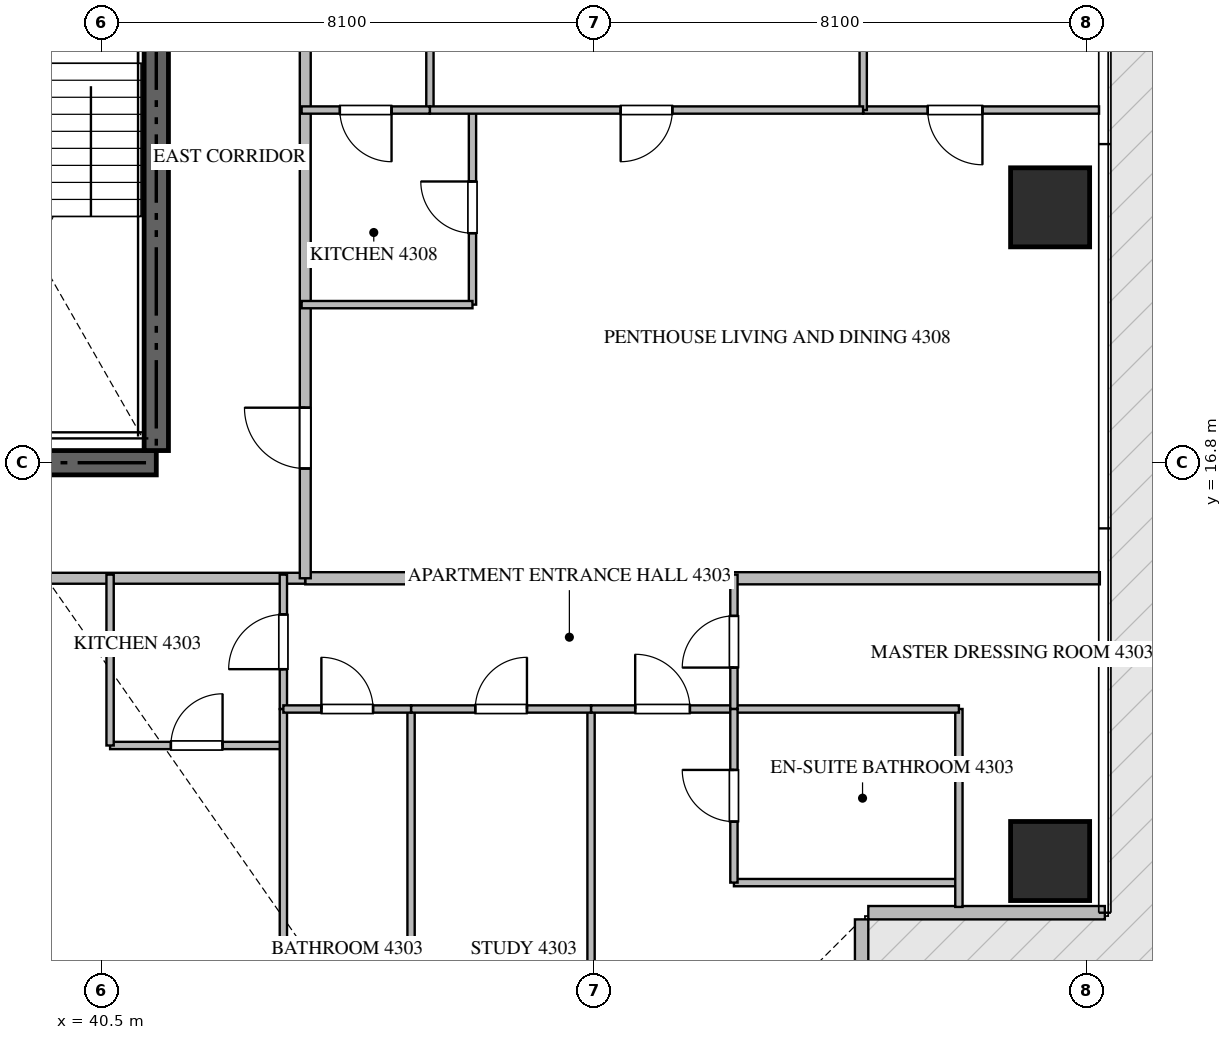
"""IFC4 building model, lengths in metres.
Left out: names, types, materials, properties, quantities, classifications, styles, units other than length and angle.
Written with IfcOpenShell. Run it as: python <this file> out.ifc"""

import sys

from ifc_helpers import new_model, si_unit, direction, frame, frame_2d, origin, origin_2d, place, context, subcontext, project, spatial, rectangle, extrude, source, transform, mapped, element, fill, save


model = new_model("IFC4")
c1 = context("Model", 3, precision=1e-05, world=origin(), true_north=direction((0.0, 1.0)))
c2 = subcontext(c1, "Body", "Model", "MODEL_VIEW")
j1 = project(units=[si_unit("LENGTHUNIT", "METRE"), si_unit("PLANEANGLEUNIT", "RADIAN")], contexts=[c1])
p1 = place(None, origin())
s1 = spatial("IfcSite", under=j1, at=p1, CompositionType="ELEMENT")
p2 = place(p1, origin())
s2 = spatial("IfcBuilding", under=s1, at=p2, CompositionType="ELEMENT")
p3 = place(p2, frame((0.0, 0.0, 172.65)))
s3 = spatial("IfcBuildingStorey", under=s2, at=p3, CompositionType="ELEMENT", Elevation=172.65)
p4 = place(p3, frame((23.4, 16.8, -0.26), z_axis=(0.0, 0.0, 1.0), x_axis=(1.0, 0.0, 0.0)))
e1 = element("IfcWall", 1, at=p4, inside=s3, PredefinedType="SHEAR", context=c2, shape_type="SweptSolid", body=[
    extrude(rectangle(XDim=18.0, YDim=0.4, at=frame_2d((9.0, 0.0))), origin(), (0.0, 0.0, 1.0), 3.748),
])
p5 = place(p3, frame((41.4, 17.0, -0.26), z_axis=(0.0, 0.0, 1.0), x_axis=(0.0, 1.0, 0.0)))
e2 = element("IfcWall", 2, at=p5, inside=s3, PredefinedType="SHEAR", context=c2, shape_type="SweptSolid", body=[
    extrude(rectangle(XDim=8.35, YDim=0.4, at=frame_2d((4.175, 0.0))), origin(), (0.0, 0.0, 1.0), 3.748),
])
m1 = source(origin(), c2, "Body", "SweptSolid", [
    extrude(rectangle(XDim=1.3, YDim=1.3, at=origin_2d()), origin(), (0.0, 0.0, 1.0), 3.75),
])
for number, where, z_axis, x_axis in (
    (3, (56.1, 10.25, -0.26), (0.0, 0.0, 1.0), (1.0, 0.0, 0.0)),
    (4, (56.1, 21.0, -0.26), (0.0, 0.0, 1.0), (1.0, 0.0, 0.0)),
):
    element("IfcColumn", number, at=place(p3, frame(where, z_axis=z_axis, x_axis=x_axis)), inside=s3, PredefinedType="COLUMN", context=c2, shape_type="MappedRepresentation", body=[
        mapped(m1, transform((0.0, 0.0, 0.0), scale=1.0)),
    ])
p6 = place(p3, frame((53.0, 5.51, 0.0), z_axis=(0.0, 0.0, 1.0), x_axis=(0.0, 1.0, 0.0)))
e5 = element("IfcWall", 5, at=p6, inside=s3, PredefinedType="ELEMENTEDWALL", context=c2, shape_type="SweptSolid", body=[
    extrude(rectangle(XDim=3.78, YDim=0.22, at=frame_2d((1.89, 0.0))), origin(), (0.0, 0.0, 1.0), 3.475),
])
p7 = place(p6, frame((1.19, 0.0, 0.65)))
e6 = element("IfcOpeningElement", 6, at=p7, cuts=e5, PredefinedType="OPENING", context=c2, shape_type="SweptSolid", body=[
    extrude(rectangle(XDim=1.4, YDim=2.05, at=frame_2d((0.7, 1.025))), frame((0.0, 0.12, 0.0), z_axis=(0.0, -1.0, 0.0), x_axis=(1.0, 0.0, 0.0)), (0.0, 0.0, 1.0), 0.24),
])
p8 = place(p3, frame((53.11, 9.4, 0.0), z_axis=(0.0, 0.0, 1.0), x_axis=(1.0, 0.0, 0.0)))
e7 = element("IfcWall", 7, at=p8, inside=s3, PredefinedType="ELEMENTEDWALL", context=c2, shape_type="SweptSolid", body=[
    extrude(rectangle(XDim=3.89, YDim=0.22, at=frame_2d((1.945, 0.0))), origin(), (0.0, 0.0, 1.0), 3.475),
])
p9 = place(p3, frame((43.85, 14.9, 0.0), z_axis=(0.0, 0.0, 1.0), x_axis=(1.0, 0.0, 0.0)))
e8 = element("IfcWall", 8, at=p9, inside=s3, PredefinedType="PARTITIONING", context=c2, shape_type="SweptSolid", body=[
    extrude(rectangle(XDim=13.068, YDim=0.2, at=frame_2d((6.534, 0.0))), origin(), (0.0, 0.0, 1.0), 3.49),
])
p10 = place(p3, frame((20.952, 14.9, 0.0), z_axis=(0.0, 0.0, 1.0), x_axis=(1.0, 0.0, 0.0)))
e9 = element("IfcWall", 9, at=p10, inside=s3, PredefinedType="PARTITIONING", context=c2, shape_type="SweptSolid", body=[
    extrude(rectangle(XDim=22.896, YDim=0.18, at=frame_2d((11.448, 0.0))), origin(), (0.0, 0.0, 1.0), 3.49),
])
p11 = place(p10, frame((2.387, 0.0, 0.0)))
e10 = element("IfcOpeningElement", 10, at=p11, cuts=e9, PredefinedType="OPENING", context=c2, shape_type="SweptSolid", body=[
    extrude(rectangle(XDim=1.0, YDim=2.15, at=frame_2d((0.5, 1.075))), frame((0.0, 0.1, 0.0), z_axis=(0.0, -1.0, 0.0), x_axis=(1.0, 0.0, 0.0)), (0.0, 0.0, 1.0), 0.2),
])
p12 = place(p10, frame((6.591, 0.0, 0.0)))
e11 = element("IfcOpeningElement", 11, at=p12, cuts=e9, PredefinedType="OPENING", context=c2, shape_type="SweptSolid", body=[
    extrude(rectangle(XDim=1.0, YDim=2.15, at=frame_2d((0.5, 1.075))), frame((0.0, 0.1, 0.0), z_axis=(0.0, -1.0, 0.0), x_axis=(1.0, 0.0, 0.0)), (0.0, 0.0, 1.0), 0.2),
])
p13 = place(p10, frame((16.51, 0.0, 0.0)))
e12 = element("IfcOpeningElement", 12, at=p13, cuts=e9, PredefinedType="OPENING", context=c2, shape_type="SweptSolid", body=[
    extrude(rectangle(XDim=1.0, YDim=2.15, at=frame_2d((0.5, 1.075))), frame((0.0, 0.1, 0.0), z_axis=(0.0, -1.0, 0.0), x_axis=(1.0, 0.0, 0.0)), (0.0, 0.0, 1.0), 0.2),
])
p14 = place(p3, frame((43.85, 14.9, 0.0), z_axis=(0.0, 0.0, 1.0), x_axis=(0.0, 1.0, 0.0)))
e13 = element("IfcWall", 13, at=p14, inside=s3, PredefinedType="PARTITIONING", context=c2, shape_type="SweptSolid", body=[
    extrude(rectangle(XDim=18.7, YDim=0.18, at=frame_2d((9.35, 0.0))), origin(), (0.0, 0.0, 1.0), 3.49),
])
p15 = place(p14, frame((1.805, 0.0, 0.0)))
e14 = element("IfcOpeningElement", 14, at=p15, cuts=e13, PredefinedType="OPENING", context=c2, shape_type="SweptSolid", body=[
    extrude(rectangle(XDim=1.0, YDim=2.15, at=frame_2d((0.5, 1.075))), frame((0.0, 0.1, 0.0), z_axis=(0.0, -1.0, 0.0), x_axis=(1.0, 0.0, 0.0)), (0.0, 0.0, 1.0), 0.2),
])
p16 = place(p3, frame((40.64, 12.15, 0.0), z_axis=(0.0, 0.0, 1.0), x_axis=(1.0, 0.0, 0.0)))
e15 = element("IfcWall", 15, at=p16, inside=s3, PredefinedType="PARTITIONING", context=c2, shape_type="SweptSolid", body=[
    extrude(rectangle(XDim=2.85, YDim=0.12, at=frame_2d((1.425, 0.0))), origin(), (0.0, 0.0, 1.0), 3.49),
])
p17 = place(p16, frame((1.0, 0.0, 0.0)))
e16 = element("IfcOpeningElement", 16, at=p17, cuts=e15, PredefinedType="OPENING", context=c2, shape_type="SweptSolid", body=[
    extrude(rectangle(XDim=0.85, YDim=2.1, at=frame_2d((0.425, 1.05))), frame((0.0, 0.07, 0.0), z_axis=(0.0, -1.0, 0.0), x_axis=(1.0, 0.0, 0.0)), (0.0, 0.0, 1.0), 0.14),
])
p18 = place(p3, frame((40.64, 12.15, 0.0), z_axis=(0.0, 0.0, 1.0), x_axis=(0.0, 1.0, 0.0)))
e17 = element("IfcWall", 17, at=p18, inside=s3, PredefinedType="PARTITIONING", context=c2, shape_type="SweptSolid", body=[
    extrude(rectangle(XDim=2.81, YDim=0.12, at=frame_2d((1.405, 0.0))), origin(), (0.0, 0.0, 1.0), 3.49),
])
p19 = place(p3, frame((43.49, 12.75, 0.0), z_axis=(0.0, 0.0, 1.0), x_axis=(0.0, 1.0, 0.0)))
e18 = element("IfcWall", 18, at=p19, inside=s3, PredefinedType="PARTITIONING", context=c2, shape_type="SweptSolid", body=[
    extrude(rectangle(XDim=2.21, YDim=0.12, at=frame_2d((1.105, 0.0))), origin(), (0.0, 0.0, 1.0), 3.49),
])
p20 = place(p19, frame((0.655, 0.0, 0.0)))
e19 = element("IfcOpeningElement", 19, at=p20, cuts=e18, PredefinedType="OPENING", context=c2, shape_type="SweptSolid", body=[
    extrude(rectangle(XDim=0.9, YDim=2.1, at=frame_2d((0.45, 1.05))), frame((0.0, 0.07, 0.0), z_axis=(0.0, -1.0, 0.0), x_axis=(1.0, 0.0, 0.0)), (0.0, 0.0, 1.0), 0.14),
])
p21 = place(p3, frame((43.49, 5.388, 0.0), z_axis=(0.0, 0.0, 1.0), x_axis=(0.0, 1.0, 0.0)))
e20 = element("IfcWall", 20, at=p21, inside=s3, PredefinedType="PARTITIONING", context=c2, shape_type="SweptSolid", body=[
    extrude(rectangle(XDim=7.36, YDim=0.12, at=frame_2d((3.68, 0.0))), origin(), (0.0, 0.0, 1.0), 3.49),
])
p22 = place(p3, frame((48.55, 1.495, 0.0), z_axis=(0.0, 0.0, 1.0), x_axis=(0.0, 1.0, 0.0)))
e21 = element("IfcWall", 21, at=p22, inside=s3, PredefinedType="PARTITIONING", context=c2, shape_type="SweptSolid", body=[
    extrude(rectangle(XDim=11.255, YDim=0.12, at=frame_2d((5.627, 0.0))), origin(), (0.0, 0.0, 1.0), 3.49),
])
p23 = place(p3, frame((45.59, 5.386, 0.0), z_axis=(0.0, 0.0, 1.0), x_axis=(0.0, 1.0, 0.0)))
e22 = element("IfcWall", 22, at=p23, inside=s3, PredefinedType="PARTITIONING", context=c2, shape_type="SweptSolid", body=[
    extrude(rectangle(XDim=7.364, YDim=0.12, at=frame_2d((3.682, 0.0))), origin(), (0.0, 0.0, 1.0), 3.49),
])
p24 = place(p3, frame((43.49, 12.75, 0.0), z_axis=(0.0, 0.0, 1.0), x_axis=(1.0, 0.0, 0.0)))
e23 = element("IfcWall", 23, at=p24, inside=s3, PredefinedType="PARTITIONING", context=c2, shape_type="SweptSolid", body=[
    extrude(rectangle(XDim=2.1, YDim=0.12, at=frame_2d((1.05, 0.0))), origin(), (0.0, 0.0, 1.0), 3.49),
])
p25 = place(p24, frame((0.625, 0.0, 0.0)))
e24 = element("IfcOpeningElement", 24, at=p25, cuts=e23, PredefinedType="OPENING", context=c2, shape_type="SweptSolid", body=[
    extrude(rectangle(XDim=0.85, YDim=2.1, at=frame_2d((0.425, 1.05))), frame((0.0, 0.07, 0.0), z_axis=(0.0, -1.0, 0.0), x_axis=(1.0, 0.0, 0.0)), (0.0, 0.0, 1.0), 0.14),
])
p26 = place(p3, frame((45.592, 12.75, 0.0), z_axis=(0.0, 0.0, 1.0), x_axis=(1.0, 0.0, 0.0)))
e25 = element("IfcWall", 25, at=p26, inside=s3, PredefinedType="PARTITIONING", context=c2, shape_type="SweptSolid", body=[
    extrude(rectangle(XDim=2.958, YDim=0.12, at=frame_2d((1.479, 0.0))), origin(), (0.0, 0.0, 1.0), 3.49),
])
p27 = place(p26, frame((1.054, 0.0, 0.0)))
e26 = element("IfcOpeningElement", 26, at=p27, cuts=e25, PredefinedType="OPENING", context=c2, shape_type="SweptSolid", body=[
    extrude(rectangle(XDim=0.85, YDim=2.1, at=frame_2d((0.425, 1.05))), frame((0.0, 0.07, 0.0), z_axis=(0.0, -1.0, 0.0), x_axis=(1.0, 0.0, 0.0)), (0.0, 0.0, 1.0), 0.14),
])
p28 = place(p3, frame((48.552, 12.75, 0.0), z_axis=(0.0, 0.0, 1.0), x_axis=(1.0, 0.0, 0.0)))
e27 = element("IfcWall", 27, at=p28, inside=s3, PredefinedType="PARTITIONING", context=c2, shape_type="SweptSolid", body=[
    extrude(rectangle(XDim=2.348, YDim=0.12, at=frame_2d((1.174, 0.0))), origin(), (0.0, 0.0, 1.0), 3.49),
])
p29 = place(p28, frame((0.724, 0.0, 0.0)))
e28 = element("IfcOpeningElement", 28, at=p29, cuts=e27, PredefinedType="OPENING", context=c2, shape_type="SweptSolid", body=[
    extrude(rectangle(XDim=0.9, YDim=2.1, at=frame_2d((0.45, 1.05))), frame((0.0, 0.07, 0.0), z_axis=(0.0, -1.0, 0.0), x_axis=(1.0, 0.0, 0.0)), (0.0, 0.0, 1.0), 0.14),
])
p30 = place(p3, frame((50.9, 9.895, 0.0), z_axis=(0.0, 0.0, 1.0), x_axis=(1.0, 0.0, 0.0)))
e29 = element("IfcWall", 29, at=p30, inside=s3, PredefinedType="PARTITIONING", context=c2, shape_type="SweptSolid", body=[
    extrude(rectangle(XDim=3.7, YDim=0.12, at=frame_2d((1.85, 0.0))), origin(), (0.0, 0.0, 1.0), 3.49),
])
p31 = place(p3, frame((54.6, 9.495, 0.0), z_axis=(0.0, 0.0, 1.0), x_axis=(0.0, 1.0, 0.0)))
e30 = element("IfcWall", 30, at=p31, inside=s3, PredefinedType="PARTITIONING", context=c2, shape_type="SweptSolid", body=[
    extrude(rectangle(XDim=3.255, YDim=0.12, at=frame_2d((1.627, 0.0))), origin(), (0.0, 0.0, 1.0), 3.49),
])
p32 = place(p3, frame((50.902, 12.75, 0.0), z_axis=(0.0, 0.0, 1.0), x_axis=(1.0, 0.0, 0.0)))
e31 = element("IfcWall", 31, at=p32, inside=s3, PredefinedType="PARTITIONING", context=c2, shape_type="SweptSolid", body=[
    extrude(rectangle(XDim=3.698, YDim=0.12, at=frame_2d((1.849, 0.0))), origin(), (0.0, 0.0, 1.0), 3.49),
])
p33 = place(p3, frame((50.9, 9.895, 0.0), z_axis=(0.0, 0.0, 1.0), x_axis=(0.0, 1.0, 0.0)))
e32 = element("IfcWall", 32, at=p33, inside=s3, PredefinedType="PARTITIONING", context=c2, shape_type="SweptSolid", body=[
    extrude(rectangle(XDim=2.855, YDim=0.12, at=frame_2d((1.427, 0.0))), origin(), (0.0, 0.0, 1.0), 3.49),
])
p34 = place(p33, frame((1.003, 0.0, 0.0)))
e33 = element("IfcOpeningElement", 33, at=p34, cuts=e32, PredefinedType="OPENING", context=c2, shape_type="SweptSolid", body=[
    extrude(rectangle(XDim=0.85, YDim=2.1, at=frame_2d((0.425, 1.05))), frame((0.0, 0.07, 0.0), z_axis=(0.0, -1.0, 0.0), x_axis=(1.0, 0.0, 0.0)), (0.0, 0.0, 1.0), 0.14),
])
p35 = place(p3, frame((50.9, 12.752, 0.0), z_axis=(0.0, 0.0, 1.0), x_axis=(0.0, 1.0, 0.0)))
e34 = element("IfcWall", 34, at=p35, inside=s3, PredefinedType="PARTITIONING", context=c2, shape_type="SweptSolid", body=[
    extrude(rectangle(XDim=2.208, YDim=0.12, at=frame_2d((1.104, 0.0))), origin(), (0.0, 0.0, 1.0), 3.49),
])
p36 = place(p35, frame((0.679, 0.0, 0.0)))
e35 = element("IfcOpeningElement", 35, at=p36, cuts=e34, PredefinedType="OPENING", context=c2, shape_type="SweptSolid", body=[
    extrude(rectangle(XDim=0.85, YDim=2.1, at=frame_2d((0.425, 1.05))), frame((0.0, 0.07, 0.0), z_axis=(0.0, -1.0, 0.0), x_axis=(1.0, 0.0, 0.0)), (0.0, 0.0, 1.0), 0.14),
])
p37 = place(p3, frame((46.6, 19.4, 0.0), z_axis=(0.0, 0.0, 1.0), x_axis=(0.0, 1.0, 0.0)))
e36 = element("IfcWall", 36, at=p37, inside=s3, PredefinedType="PARTITIONING", context=c2, shape_type="SweptSolid", body=[
    extrude(rectangle(XDim=3.2, YDim=0.12, at=frame_2d((1.6, 0.0))), origin(), (0.0, 0.0, 1.0), 3.49),
])
p38 = place(p37, frame((1.175, 0.0, 0.0)))
e37 = element("IfcOpeningElement", 37, at=p38, cuts=e36, PredefinedType="OPENING", context=c2, shape_type="SweptSolid", body=[
    extrude(rectangle(XDim=0.85, YDim=2.1, at=frame_2d((0.425, 1.05))), frame((0.0, 0.07, 0.0), z_axis=(0.0, -1.0, 0.0), x_axis=(1.0, 0.0, 0.0)), (0.0, 0.0, 1.0), 0.14),
])
p39 = place(p3, frame((46.6, 19.4, 0.0), z_axis=(0.0, 0.0, 1.0), x_axis=(-1.0, 0.0, 0.0)))
e38 = element("IfcWall", 38, at=p39, inside=s3, PredefinedType="PARTITIONING", context=c2, shape_type="SweptSolid", body=[
    extrude(rectangle(XDim=2.81, YDim=0.12, at=frame_2d((1.405, 0.0))), origin(), (0.0, 0.0, 1.0), 3.49),
])
p40 = place(p3, frame((56.905, 22.6, 0.0), z_axis=(0.0, 0.0, 1.0), x_axis=(-1.0, 0.0, 0.0)))
e39 = element("IfcWall", 39, at=p40, inside=s3, PredefinedType="PARTITIONING", context=c2, shape_type="SweptSolid", body=[
    extrude(rectangle(XDim=3.879, YDim=0.12, at=frame_2d((1.939, 0.0))), origin(), (0.0, 0.0, 1.0), 3.49),
])
p41 = place(p40, frame((1.918, 0.0, 0.0)))
e40 = element("IfcOpeningElement", 40, at=p41, cuts=e39, PredefinedType="OPENING", context=c2, shape_type="SweptSolid", body=[
    extrude(rectangle(XDim=0.9, YDim=2.1, at=frame_2d((0.45, 1.05))), frame((0.0, 0.07, 0.0), z_axis=(0.0, -1.0, 0.0), x_axis=(1.0, 0.0, 0.0)), (0.0, 0.0, 1.0), 0.14),
])
p42 = place(p3, frame((53.026, 22.6, 0.0), z_axis=(0.0, 0.0, 1.0), x_axis=(0.0, 1.0, 0.0)))
e41 = element("IfcWall", 41, at=p42, inside=s3, PredefinedType="PARTITIONING", context=c2, shape_type="SweptSolid", body=[
    extrude(rectangle(XDim=11.06, YDim=0.12, at=frame_2d((5.53, 0.0))), origin(), (0.0, 0.0, 1.0), 3.49),
])
p43 = place(p3, frame((45.9, 22.6, 0.0), z_axis=(0.0, 0.0, 1.0), x_axis=(0.0, 1.0, 0.0)))
e42 = element("IfcWall", 42, at=p43, inside=s3, PredefinedType="PARTITIONING", context=c2, shape_type="SweptSolid", body=[
    extrude(rectangle(XDim=3.2, YDim=0.12, at=frame_2d((1.6, 0.0))), origin(), (0.0, 0.0, 1.0), 3.49),
])
p44 = place(p3, frame((53.024, 22.6, 0.0), z_axis=(0.0, 0.0, 1.0), x_axis=(-1.0, 0.0, 0.0)))
e43 = element("IfcWall", 43, at=p44, inside=s3, PredefinedType="PARTITIONING", context=c2, shape_type="SweptSolid", body=[
    extrude(rectangle(XDim=7.124, YDim=0.12, at=frame_2d((3.562, 0.0))), origin(), (0.0, 0.0, 1.0), 3.49),
])
p45 = place(p44, frame((3.137, 0.0, 0.0)))
e44 = element("IfcOpeningElement", 44, at=p45, cuts=e43, PredefinedType="OPENING", context=c2, shape_type="SweptSolid", body=[
    extrude(rectangle(XDim=0.85, YDim=2.1, at=frame_2d((0.425, 1.05))), frame((0.0, 0.07, 0.0), z_axis=(0.0, -1.0, 0.0), x_axis=(1.0, 0.0, 0.0)), (0.0, 0.0, 1.0), 0.14),
])
p46 = place(p3, frame((45.898, 22.6, 0.0), z_axis=(0.0, 0.0, 1.0), x_axis=(-1.0, 0.0, 0.0)))
e45 = element("IfcWall", 45, at=p46, inside=s3, PredefinedType="PARTITIONING", context=c2, shape_type="SweptSolid", body=[
    extrude(rectangle(XDim=2.108, YDim=0.12, at=frame_2d((1.054, 0.0))), origin(), (0.0, 0.0, 1.0), 3.49),
])
p47 = place(p46, frame((0.629, 0.0, 0.0)))
e46 = element("IfcOpeningElement", 46, at=p47, cuts=e45, PredefinedType="OPENING", context=c2, shape_type="SweptSolid", body=[
    extrude(rectangle(XDim=0.85, YDim=2.1, at=frame_2d((0.425, 1.05))), frame((0.0, 0.07, 0.0), z_axis=(0.0, -1.0, 0.0), x_axis=(1.0, 0.0, 0.0)), (0.0, 0.0, 1.0), 0.14),
])
m2 = source(origin(), c2, "Body", "SweptSolid", [
    extrude(rectangle(XDim=1.0, YDim=2.15, at=frame_2d((0.5, 1.075))), frame((0.0, 0.025, 0.0), z_axis=(0.0, -1.0, 0.0), x_axis=(1.0, 0.0, 0.0)), (0.0, 0.0, 1.0), 0.05),
])
p48 = place(p15, origin())
e47 = element("IfcDoor", 47, at=p48, inside=s3, OperationType="SINGLE_SWING_RIGHT", PredefinedType="DOOR", context=c2, shape_type="MappedRepresentation", body=[
    mapped(m2, transform((0.0, 0.0, 0.0), scale=1.0)),
])
fill(e14, e47)
m3 = source(origin(), c2, "Body", "SweptSolid", [
    extrude(rectangle(XDim=0.85, YDim=2.1, at=frame_2d((0.425, 1.05))), frame((0.0, 0.025, 0.0), z_axis=(0.0, -1.0, 0.0), x_axis=(1.0, 0.0, 0.0)), (0.0, 0.0, 1.0), 0.05),
])
p49 = place(p17, origin())
e48 = element("IfcDoor", 48, at=p49, inside=s3, OperationType="SINGLE_SWING_RIGHT", PredefinedType="DOOR", context=c2, shape_type="MappedRepresentation", body=[
    mapped(m3, transform((0.0, 0.0, 0.0), scale=1.0)),
])
fill(e16, e48)
m4 = source(origin(), c2, "Body", "SweptSolid", [
    extrude(rectangle(XDim=0.9, YDim=2.1, at=frame_2d((0.45, 1.05))), frame((0.0, 0.025, 0.0), z_axis=(0.0, -1.0, 0.0), x_axis=(1.0, 0.0, 0.0)), (0.0, 0.0, 1.0), 0.05),
])
p50 = place(p20, origin())
e49 = element("IfcDoor", 49, at=p50, inside=s3, OperationType="SINGLE_SWING_LEFT", PredefinedType="DOOR", context=c2, shape_type="MappedRepresentation", body=[
    mapped(m4, transform((0.0, 0.0, 0.0), scale=1.0)),
])
fill(e19, e49)
p51 = place(p25, origin())
e50 = element("IfcDoor", 50, at=p51, inside=s3, OperationType="SINGLE_SWING_LEFT", PredefinedType="DOOR", context=c2, shape_type="MappedRepresentation", body=[
    mapped(m3, transform((0.0, 0.0, 0.0), scale=1.0)),
])
fill(e24, e50)
p52 = place(p27, origin())
e51 = element("IfcDoor", 51, at=p52, inside=s3, OperationType="SINGLE_SWING_RIGHT", PredefinedType="DOOR", context=c2, shape_type="MappedRepresentation", body=[
    mapped(m3, transform((0.0, 0.0, 0.0), scale=1.0)),
])
fill(e26, e51)
p53 = place(p29, origin())
e52 = element("IfcDoor", 52, at=p53, inside=s3, OperationType="SINGLE_SWING_LEFT", PredefinedType="DOOR", context=c2, shape_type="MappedRepresentation", body=[
    mapped(m4, transform((0.0, 0.0, 0.0), scale=1.0)),
])
fill(e28, e52)
p54 = place(p34, origin())
e53 = element("IfcDoor", 53, at=p54, inside=s3, OperationType="SINGLE_SWING_RIGHT", PredefinedType="DOOR", context=c2, shape_type="MappedRepresentation", body=[
    mapped(m3, transform((0.0, 0.0, 0.0), scale=1.0)),
])
fill(e33, e53)
p55 = place(p36, origin())
e54 = element("IfcDoor", 54, at=p55, inside=s3, OperationType="SINGLE_SWING_LEFT", PredefinedType="DOOR", context=c2, shape_type="MappedRepresentation", body=[
    mapped(m3, transform((0.0, 0.0, 0.0), scale=1.0)),
])
fill(e35, e54)
p56 = place(p38, origin())
e55 = element("IfcDoor", 55, at=p56, inside=s3, OperationType="SINGLE_SWING_RIGHT", PredefinedType="DOOR", context=c2, shape_type="MappedRepresentation", body=[
    mapped(m3, transform((0.0, 0.0, 0.0), scale=1.0)),
])
fill(e37, e55)
p57 = place(p41, origin())
e56 = element("IfcDoor", 56, at=p57, inside=s3, OperationType="SINGLE_SWING_LEFT", PredefinedType="DOOR", context=c2, shape_type="MappedRepresentation", body=[
    mapped(m4, transform((0.0, 0.0, 0.0), scale=1.0)),
])
fill(e40, e56)
p58 = place(p45, origin())
e57 = element("IfcDoor", 57, at=p58, inside=s3, OperationType="SINGLE_SWING_RIGHT", PredefinedType="DOOR", context=c2, shape_type="MappedRepresentation", body=[
    mapped(m3, transform((0.0, 0.0, 0.0), scale=1.0)),
])
fill(e44, e57)
p59 = place(p47, origin())
e58 = element("IfcDoor", 58, at=p59, inside=s3, OperationType="SINGLE_SWING_LEFT", PredefinedType="DOOR", context=c2, shape_type="MappedRepresentation", body=[
    mapped(m3, transform((0.0, 0.0, 0.0), scale=1.0)),
])
fill(e46, e58)
save(model, sys.argv[1])
